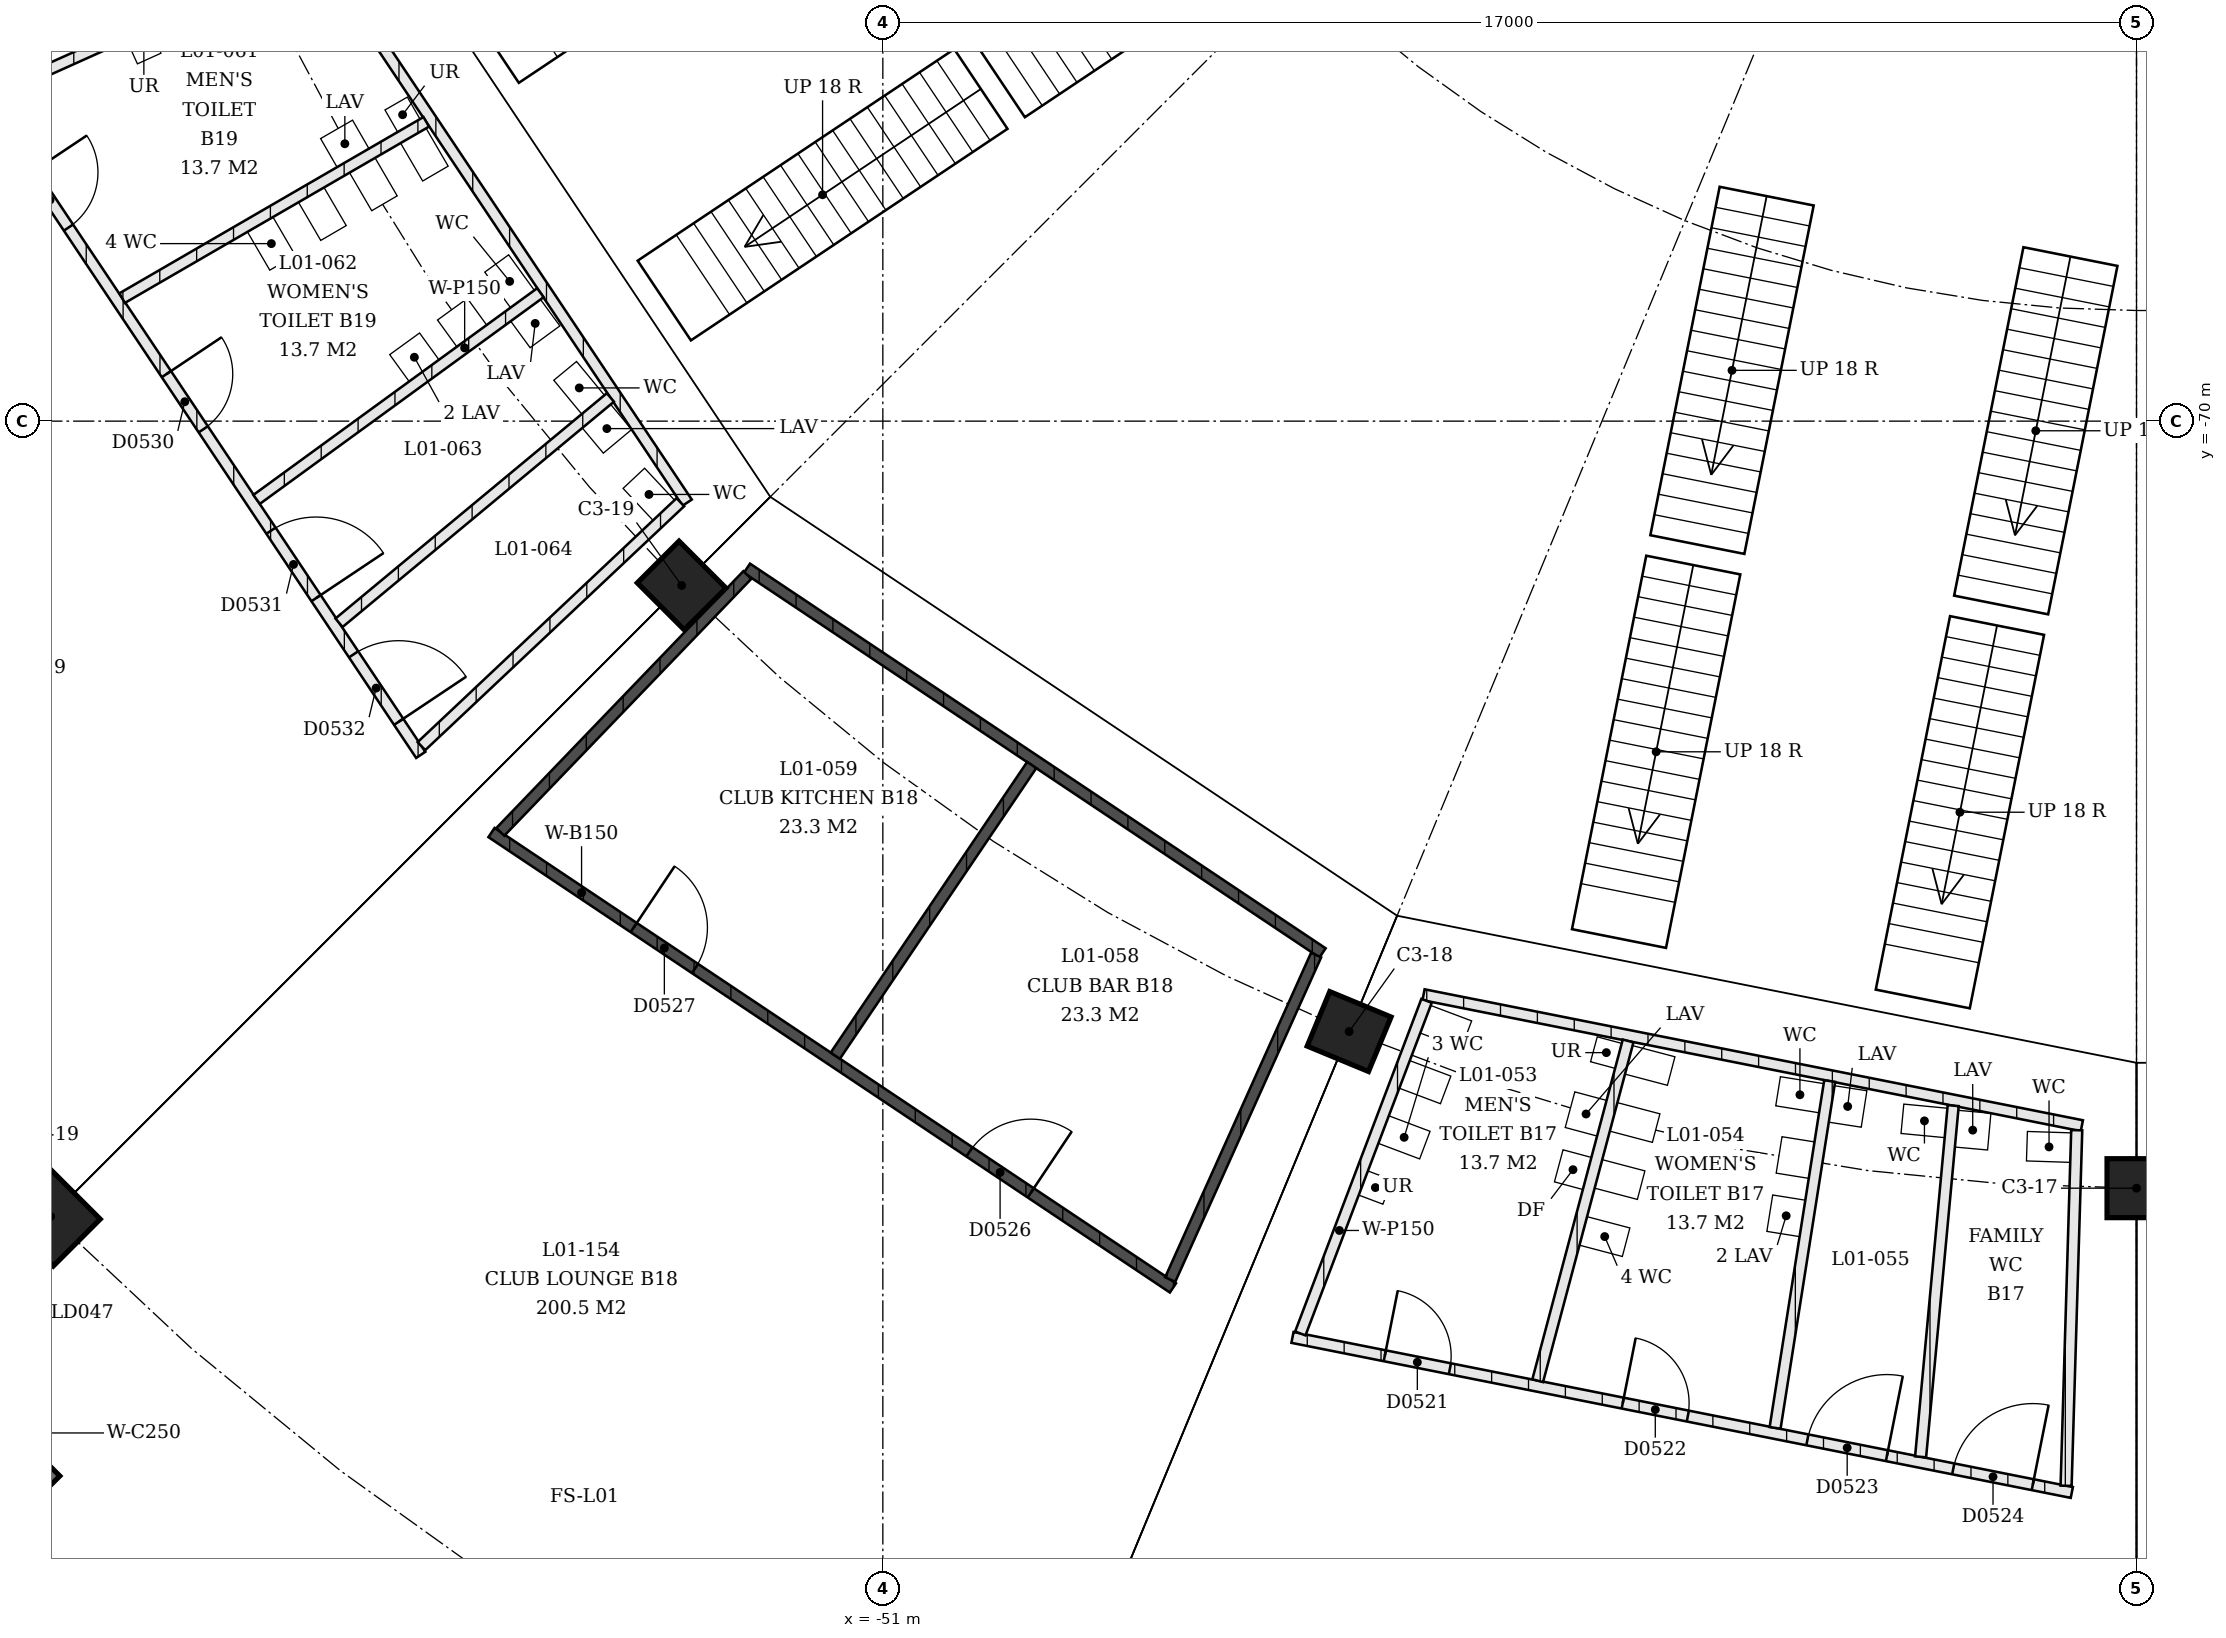
"""IFC4 building model, lengths in metres.
Left out: names, types, materials, properties, quantities, classifications, styles, units other than length and angle.
Written with IfcOpenShell. Run it as: python <this file> out.ifc"""

import sys

from ifc_helpers import new_model, si_unit, direction, frame, frame_2d, origin, origin_2d, place, context, subcontext, project, spatial, rectangle, extrude, element, fill, save


model = new_model("IFC4")
c1 = context("Model", 3, precision=1e-05, world=origin(), true_north=direction((0.0, 1.0)))
c2 = subcontext(c1, "Body", "Model", "MODEL_VIEW")
j1 = project(units=[si_unit("LENGTHUNIT", "METRE"), si_unit("PLANEANGLEUNIT", "RADIAN")], contexts=[c1])
p1 = place(None, origin())
s1 = spatial("IfcSite", under=j1, at=p1, CompositionType="ELEMENT")
p2 = place(p1, origin())
s2 = spatial("IfcBuilding", under=s1, at=p2, CompositionType="ELEMENT")
p3 = place(p2, frame((0.0, 0.0, 4.5)))
s3 = spatial("IfcBuildingStorey", under=s2, at=p3, CompositionType="ELEMENT", Elevation=4.5)
p4 = place(p3, frame((-34.0, -80.4, 0.0), z_axis=(0.0, 0.0, 1.0), x_axis=(1.0, 0.0, 0.0)))
e1 = element("IfcColumn", 1, at=p4, inside=s3, PredefinedType="COLUMN", context=c2, shape_type="SweptSolid", body=[
    extrude(rectangle(XDim=0.8, YDim=0.8, at=origin_2d()), origin(), (0.0, 0.0, 1.0), 4.5),
])
for number, where, z_axis, x_axis in (
    (2, (-44.677, -78.276, 0.0), (0.0, 0.0, 1.0), (0.924, -0.383, 0.0)),
    (3, (-53.728, -72.228, 0.0), (0.0, 0.0, 1.0), (0.707, -0.707, 0.0)),
):
    element("IfcColumn", number, at=place(p3, frame(where, z_axis=z_axis, x_axis=x_axis)), inside=s3, PredefinedType="COLUMN", context=c2, shape_type="SweptSolid", body=[
        extrude(rectangle(XDim=0.9, YDim=0.8, at=origin_2d()), origin(), (0.0, 0.0, 1.0), 4.5),
    ])
p5 = place(p3, frame((-62.284, -80.784, 0.0), z_axis=(0.0, 0.0, 1.0), x_axis=(0.707106781187, -0.707106781187, 0.0)))
e4 = element("IfcColumn", 4, at=p5, inside=s3, PredefinedType="COLUMN", context=c2, shape_type="SweptSolid", body=[
    extrude(rectangle(XDim=1.0, YDim=0.9, at=origin_2d()), origin(), (0.0, 0.0, 1.0), 4.5),
])
p6 = place(p3, frame((-65.891, -80.749, 0.0), z_axis=(0.0, 0.0, 1.0), x_axis=(0.707106781187, -0.707106781187, 0.0)))
e5 = element("IfcWall", 5, at=p6, inside=s3, PredefinedType="SHEAR", context=c2, shape_type="SweptSolid", body=[
    extrude(rectangle(XDim=5.15, YDim=0.25, at=frame_2d((2.575, 0.0))), origin(), (0.0, 0.0, 1.0), 4.09),
])
p7 = place(p6, frame((0.8, 0.0, 0.0)))
e6 = element("IfcOpeningElement", 6, at=p7, cuts=e5, PredefinedType="OPENING", context=c2, shape_type="SweptSolid", body=[
    extrude(rectangle(XDim=1.1, YDim=2.1, at=frame_2d((0.55, 1.05))), frame((0.0, 0.125, 0.0), z_axis=(0.0, -1.0, 0.0), x_axis=(1.0, 0.0, 0.0)), (0.0, 0.0, 1.0), 0.25),
])
p8 = place(p6, frame((3.25, 0.0, 0.0)))
e7 = element("IfcOpeningElement", 7, at=p8, cuts=e5, PredefinedType="OPENING", context=c2, shape_type="SweptSolid", body=[
    extrude(rectangle(XDim=1.1, YDim=2.1, at=frame_2d((0.55, 1.05))), frame((0.0, 0.125, 0.0), z_axis=(0.0, -1.0, 0.0), x_axis=(1.0, 0.0, 0.0)), (0.0, 0.0, 1.0), 0.25),
])
p9 = place(p3, frame((-43.668, -77.777, 0.0), z_axis=(0.0, 0.0, 1.0), x_axis=(0.980786464492, -0.195084369103, 0.0)))
e8 = element("IfcWall", 8, at=p9, inside=s3, PredefinedType="PARTITIONING", context=c2, shape_type="SweptSolid", body=[
    extrude(rectangle(XDim=9.102, YDim=0.15, at=frame_2d((4.551, 0.0))), origin(), (0.0, 0.0, 1.0), 3.0),
])
p10 = place(p3, frame((-45.445, -82.423, 0.0), z_axis=(0.0, 0.0, 1.0), x_axis=(0.98078580384, -0.195087690502, 0.0)))
e9 = element("IfcWall", 9, at=p10, inside=s3, PredefinedType="PARTITIONING", context=c2, shape_type="SweptSolid", body=[
    extrude(rectangle(XDim=10.775, YDim=0.15, at=frame_2d((5.387, 0.0))), origin(), (0.0, 0.0, 1.0), 3.0),
])
p11 = place(p10, frame((1.276, 0.0, 0.0)))
e10 = element("IfcOpeningElement", 10, at=p11, cuts=e9, PredefinedType="OPENING", context=c2, shape_type="SweptSolid", body=[
    extrude(rectangle(XDim=0.9, YDim=2.1, at=frame_2d((0.45, 1.05))), frame((0.0, 0.075, 0.0), z_axis=(0.0, -1.0, 0.0), x_axis=(1.0, 0.0, 0.0)), (0.0, 0.0, 1.0), 0.15),
])
p12 = place(p10, frame((4.566, 0.0, 0.0)))
e11 = element("IfcOpeningElement", 11, at=p12, cuts=e9, PredefinedType="OPENING", context=c2, shape_type="SweptSolid", body=[
    extrude(rectangle(XDim=0.9, YDim=2.1, at=frame_2d((0.45, 1.05))), frame((0.0, 0.075, 0.0), z_axis=(0.0, -1.0, 0.0), x_axis=(1.0, 0.0, 0.0)), (0.0, 0.0, 1.0), 0.15),
])
p13 = place(p10, frame((7.119, 0.0, 0.0)))
e12 = element("IfcOpeningElement", 12, at=p13, cuts=e9, PredefinedType="OPENING", context=c2, shape_type="SweptSolid", body=[
    extrude(rectangle(XDim=1.1, YDim=2.1, at=frame_2d((0.55, 1.05))), frame((0.0, 0.075, 0.0), z_axis=(0.0, -1.0, 0.0), x_axis=(1.0, 0.0, 0.0)), (0.0, 0.0, 1.0), 0.15),
])
p14 = place(p10, frame((9.135, 0.0, 0.0)))
e13 = element("IfcOpeningElement", 13, at=p14, cuts=e9, PredefinedType="OPENING", context=c2, shape_type="SweptSolid", body=[
    extrude(rectangle(XDim=1.1, YDim=2.1, at=frame_2d((0.55, 1.05))), frame((0.0, 0.075, 0.0), z_axis=(0.0, -1.0, 0.0), x_axis=(1.0, 0.0, 0.0)), (0.0, 0.0, 1.0), 0.15),
])
p15 = place(p3, frame((-43.627, -77.86, 0.0), z_axis=(0.0, 0.0, 1.0), x_axis=(-0.354909029819, -0.934900839957, 0.0)))
e14 = element("IfcWall", 14, at=p15, inside=s3, PredefinedType="PARTITIONING", context=c2, shape_type="SweptSolid", body=[
    extrude(rectangle(XDim=4.823, YDim=0.15, at=frame_2d((2.412, 0.0))), origin(), (0.0, 0.0, 1.0), 3.0),
])
p16 = place(p3, frame((-40.894, -78.404, 0.0), z_axis=(0.0, 0.0, 1.0), x_axis=(-0.257187590259, -0.966361497276, 0.0)))
e15 = element("IfcWall", 15, at=p16, inside=s3, PredefinedType="PARTITIONING", context=c2, shape_type="SweptSolid", body=[
    extrude(rectangle(XDim=4.766, YDim=0.15, at=frame_2d((2.383, 0.0))), origin(), (0.0, 0.0, 1.0), 3.0),
])
p17 = place(p3, frame((-38.161, -78.947, 0.0), z_axis=(0.0, 0.0, 1.0), x_axis=(-0.155385827215, -0.987853857967, 0.0)))
e16 = element("IfcWall", 16, at=p17, inside=s3, PredefinedType="PARTITIONING", context=c2, shape_type="SweptSolid", body=[
    extrude(rectangle(XDim=4.761, YDim=0.15, at=frame_2d((2.38, 0.0))), origin(), (0.0, 0.0, 1.0), 3.0),
])
p18 = place(p3, frame((-36.486, -79.281, 0.0), z_axis=(0.0, 0.0, 1.0), x_axis=(-0.092395037313, -0.995722429736, 0.0)))
e17 = element("IfcWall", 17, at=p18, inside=s3, PredefinedType="PARTITIONING", context=c2, shape_type="SweptSolid", body=[
    extrude(rectangle(XDim=4.783, YDim=0.15, at=frame_2d((2.391, 0.0))), origin(), (0.0, 0.0, 1.0), 3.0),
])
p19 = place(p3, frame((-34.811, -79.614, 0.0), z_axis=(0.0, 0.0, 1.0), x_axis=(-0.02991368842, -0.999552485488, 0.0)))
e18 = element("IfcWall", 18, at=p19, inside=s3, PredefinedType="PARTITIONING", context=c2, shape_type="SweptSolid", body=[
    extrude(rectangle(XDim=4.823, YDim=0.15, at=frame_2d((2.412, 0.0))), origin(), (0.0, 0.0, 1.0), 3.0),
])
p20 = place(p3, frame((-45.037, -77.21, 0.0), z_axis=(0.0, 0.0, 1.0), x_axis=(-0.83146970134, 0.555570099766, 0.0)))
e19 = element("IfcWall", 19, at=p20, inside=s3, PredefinedType="SOLIDWALL", context=c2, shape_type="SweptSolid", body=[
    extrude(rectangle(XDim=9.388, YDim=0.15, at=frame_2d((4.694, 0.0))), origin(), (0.0, 0.0, 1.0), 3.0),
])
p21 = place(p3, frame((-47.066, -81.752, 0.0), z_axis=(0.0, 0.0, 1.0), x_axis=(-0.83146852918, 0.555571854024, 0.0)))
e20 = element("IfcWall", 20, at=p21, inside=s3, PredefinedType="SOLIDWALL", context=c2, shape_type="SweptSolid", body=[
    extrude(rectangle(XDim=11.114, YDim=0.15, at=frame_2d((5.557, 0.0))), origin(), (0.0, 0.0, 1.0), 3.0),
])
p22 = place(p21, frame((2.319, 0.0, 0.0)))
e21 = element("IfcOpeningElement", 21, at=p22, cuts=e20, PredefinedType="OPENING", context=c2, shape_type="SweptSolid", body=[
    extrude(rectangle(XDim=1.0, YDim=2.1, at=frame_2d((0.5, 1.05))), frame((0.0, 0.075, 0.0), z_axis=(0.0, -1.0, 0.0), x_axis=(1.0, 0.0, 0.0)), (0.0, 0.0, 1.0), 0.15),
])
p23 = place(p21, frame((7.794, 0.0, 0.0)))
e22 = element("IfcOpeningElement", 22, at=p23, cuts=e20, PredefinedType="OPENING", context=c2, shape_type="SweptSolid", body=[
    extrude(rectangle(XDim=1.0, YDim=2.1, at=frame_2d((0.5, 1.05))), frame((0.0, 0.075, 0.0), z_axis=(0.0, -1.0, 0.0), x_axis=(1.0, 0.0, 0.0)), (0.0, 0.0, 1.0), 0.15),
])
p24 = place(p3, frame((-45.125, -77.24, 0.0), z_axis=(0.0, 0.0, 1.0), x_axis=(-0.410107887306, -0.912037017215, 0.0)))
e23 = element("IfcWall", 23, at=p24, inside=s3, PredefinedType="SOLIDWALL", context=c2, shape_type="SweptSolid", body=[
    extrude(rectangle(XDim=4.823, YDim=0.15, at=frame_2d((2.412, 0.0))), origin(), (0.0, 0.0, 1.0), 3.0),
])
p25 = place(p3, frame((-48.981, -74.663, 0.0), z_axis=(0.0, 0.0, 1.0), x_axis=(-0.559983112244, -0.828504021717, 0.0)))
e24 = element("IfcWall", 24, at=p25, inside=s3, PredefinedType="SOLIDWALL", context=c2, shape_type="SweptSolid", body=[
    extrude(rectangle(XDim=4.757, YDim=0.15, at=frame_2d((2.378, 0.0))), origin(), (0.0, 0.0, 1.0), 3.0),
])
p26 = place(p3, frame((-52.837, -72.086, 0.0), z_axis=(0.0, 0.0, 1.0), x_axis=(-0.693179391143, -0.720765101607, 0.0)))
e25 = element("IfcWall", 25, at=p26, inside=s3, PredefinedType="SOLIDWALL", context=c2, shape_type="SweptSolid", body=[
    extrude(rectangle(XDim=4.832, YDim=0.15, at=frame_2d((2.416, 0.0))), origin(), (0.0, 0.0, 1.0), 3.0),
])
p27 = place(p3, frame((-58.71, -63.537, 0.0), z_axis=(0.0, 0.0, 1.0), x_axis=(0.555566497886, -0.831472108027, 0.0)))
e26 = element("IfcWall", 26, at=p27, inside=s3, PredefinedType="PARTITIONING", context=c2, shape_type="SweptSolid", body=[
    extrude(rectangle(XDim=9.102, YDim=0.15, at=frame_2d((4.551, 0.0))), origin(), (0.0, 0.0, 1.0), 3.0),
])
p28 = place(p3, frame((-63.252, -65.566, 0.0), z_axis=(0.0, 0.0, 1.0), x_axis=(0.555562662276, -0.831474670862, 0.0)))
e27 = element("IfcWall", 27, at=p28, inside=s3, PredefinedType="PARTITIONING", context=c2, shape_type="SweptSolid", body=[
    extrude(rectangle(XDim=10.775, YDim=0.15, at=frame_2d((5.387, 0.0))), origin(), (0.0, 0.0, 1.0), 3.0),
])
p29 = place(p28, frame((1.276, 0.0, 0.0)))
e28 = element("IfcOpeningElement", 28, at=p29, cuts=e27, PredefinedType="OPENING", context=c2, shape_type="SweptSolid", body=[
    extrude(rectangle(XDim=0.9, YDim=2.1, at=frame_2d((0.45, 1.05))), frame((0.0, 0.075, 0.0), z_axis=(0.0, -1.0, 0.0), x_axis=(1.0, 0.0, 0.0)), (0.0, 0.0, 1.0), 0.15),
])
p30 = place(p28, frame((4.566, 0.0, 0.0)))
e29 = element("IfcOpeningElement", 29, at=p30, cuts=e27, PredefinedType="OPENING", context=c2, shape_type="SweptSolid", body=[
    extrude(rectangle(XDim=0.9, YDim=2.1, at=frame_2d((0.45, 1.05))), frame((0.0, 0.075, 0.0), z_axis=(0.0, -1.0, 0.0), x_axis=(1.0, 0.0, 0.0)), (0.0, 0.0, 1.0), 0.15),
])
p31 = place(p28, frame((7.119, 0.0, 0.0)))
e30 = element("IfcOpeningElement", 30, at=p31, cuts=e27, PredefinedType="OPENING", context=c2, shape_type="SweptSolid", body=[
    extrude(rectangle(XDim=1.1, YDim=2.1, at=frame_2d((0.55, 1.05))), frame((0.0, 0.075, 0.0), z_axis=(0.0, -1.0, 0.0), x_axis=(1.0, 0.0, 0.0)), (0.0, 0.0, 1.0), 0.15),
])
p32 = place(p28, frame((9.135, 0.0, 0.0)))
e31 = element("IfcOpeningElement", 31, at=p32, cuts=e27, PredefinedType="OPENING", context=c2, shape_type="SweptSolid", body=[
    extrude(rectangle(XDim=1.1, YDim=2.1, at=frame_2d((0.55, 1.05))), frame((0.0, 0.075, 0.0), z_axis=(0.0, -1.0, 0.0), x_axis=(1.0, 0.0, 0.0)), (0.0, 0.0, 1.0), 0.15),
])
p33 = place(p3, frame((-58.74, -63.625, 0.0), z_axis=(0.0, 0.0, 1.0), x_axis=(-0.912037017215, -0.410107887306, 0.0)))
e32 = element("IfcWall", 32, at=p33, inside=s3, PredefinedType="PARTITIONING", context=c2, shape_type="SweptSolid", body=[
    extrude(rectangle(XDim=4.823, YDim=0.15, at=frame_2d((2.412, 0.0))), origin(), (0.0, 0.0, 1.0), 3.0),
])
p34 = place(p3, frame((-57.191, -65.942, 0.0), z_axis=(0.0, 0.0, 1.0), x_axis=(-0.865194750368, -0.501435981891, 0.0)))
e33 = element("IfcWall", 33, at=p34, inside=s3, PredefinedType="PARTITIONING", context=c2, shape_type="SweptSolid", body=[
    extrude(rectangle(XDim=4.767, YDim=0.15, at=frame_2d((2.383, 0.0))), origin(), (0.0, 0.0, 1.0), 3.0),
])
p35 = place(p3, frame((-55.643, -68.259, 0.0), z_axis=(0.0, 0.0, 1.0), x_axis=(-0.808436593482, -0.588583277302, 0.0)))
e34 = element("IfcWall", 34, at=p35, inside=s3, PredefinedType="PARTITIONING", context=c2, shape_type="SweptSolid", body=[
    extrude(rectangle(XDim=4.76, YDim=0.15, at=frame_2d((2.38, 0.0))), origin(), (0.0, 0.0, 1.0), 3.0),
])
p36 = place(p3, frame((-54.694, -69.679, 0.0), z_axis=(0.0, 0.0, 1.0), x_axis=(-0.769445858721, -0.638712040358, 0.0)))
e35 = element("IfcWall", 35, at=p36, inside=s3, PredefinedType="PARTITIONING", context=c2, shape_type="SweptSolid", body=[
    extrude(rectangle(XDim=4.782, YDim=0.15, at=frame_2d((2.391, 0.0))), origin(), (0.0, 0.0, 1.0), 3.0),
])
p37 = place(p3, frame((-53.746, -71.099, 0.0), z_axis=(0.0, 0.0, 1.0), x_axis=(-0.727898273696, -0.685685134118, 0.0)))
e36 = element("IfcWall", 36, at=p37, inside=s3, PredefinedType="PARTITIONING", context=c2, shape_type="SweptSolid", body=[
    extrude(rectangle(XDim=4.823, YDim=0.15, at=frame_2d((2.412, 0.0))), origin(), (0.0, 0.0, 1.0), 3.0),
])
p38 = place(p11, origin())
e37 = element("IfcDoor", 37, at=p38, inside=s3, OperationType="SINGLE_SWING_RIGHT", PredefinedType="DOOR", context=c2, shape_type="SweptSolid", body=[
    extrude(rectangle(XDim=0.9, YDim=2.1, at=frame_2d((0.45, 1.05))), frame((0.0, 0.025, 0.0), z_axis=(0.0, -1.0, 0.0), x_axis=(1.0, 0.0, 0.0)), (0.0, 0.0, 1.0), 0.05),
])
fill(e10, e37)
p39 = place(p12, origin())
e38 = element("IfcDoor", 38, at=p39, inside=s3, OperationType="SINGLE_SWING_RIGHT", PredefinedType="DOOR", context=c2, shape_type="SweptSolid", body=[
    extrude(rectangle(XDim=0.9, YDim=2.1, at=frame_2d((0.45, 1.05))), frame((0.0, 0.025, 0.0), z_axis=(0.0, -1.0, 0.0), x_axis=(1.0, 0.0, 0.0)), (0.0, 0.0, 1.0), 0.05),
])
fill(e11, e38)
p40 = place(p13, origin())
e39 = element("IfcDoor", 39, at=p40, inside=s3, OperationType="SINGLE_SWING_LEFT", PredefinedType="DOOR", context=c2, shape_type="SweptSolid", body=[
    extrude(rectangle(XDim=1.1, YDim=2.1, at=frame_2d((0.55, 1.05))), frame((0.0, 0.025, 0.0), z_axis=(0.0, -1.0, 0.0), x_axis=(1.0, 0.0, 0.0)), (0.0, 0.0, 1.0), 0.05),
])
fill(e12, e39)
p41 = place(p14, origin())
e40 = element("IfcDoor", 40, at=p41, inside=s3, OperationType="SINGLE_SWING_LEFT", PredefinedType="DOOR", context=c2, shape_type="SweptSolid", body=[
    extrude(rectangle(XDim=1.1, YDim=2.1, at=frame_2d((0.55, 1.05))), frame((0.0, 0.025, 0.0), z_axis=(0.0, -1.0, 0.0), x_axis=(1.0, 0.0, 0.0)), (0.0, 0.0, 1.0), 0.05),
])
fill(e13, e40)
p42 = place(p22, origin())
e41 = element("IfcDoor", 41, at=p42, inside=s3, OperationType="SINGLE_SWING_LEFT", PredefinedType="DOOR", context=c2, shape_type="SweptSolid", body=[
    extrude(rectangle(XDim=1.0, YDim=2.1, at=frame_2d((0.5, 1.05))), frame((0.0, 0.025, 0.0), z_axis=(0.0, -1.0, 0.0), x_axis=(1.0, 0.0, 0.0)), (0.0, 0.0, 1.0), 0.05),
])
fill(e21, e41)
p43 = place(p23, origin())
e42 = element("IfcDoor", 42, at=p43, inside=s3, OperationType="SINGLE_SWING_RIGHT", PredefinedType="DOOR", context=c2, shape_type="SweptSolid", body=[
    extrude(rectangle(XDim=1.0, YDim=2.1, at=frame_2d((0.5, 1.05))), frame((0.0, 0.025, 0.0), z_axis=(0.0, -1.0, 0.0), x_axis=(1.0, 0.0, 0.0)), (0.0, 0.0, 1.0), 0.05),
])
fill(e22, e42)
p44 = place(p29, origin())
e43 = element("IfcDoor", 43, at=p44, inside=s3, OperationType="SINGLE_SWING_RIGHT", PredefinedType="DOOR", context=c2, shape_type="SweptSolid", body=[
    extrude(rectangle(XDim=0.9, YDim=2.1, at=frame_2d((0.45, 1.05))), frame((0.0, 0.025, 0.0), z_axis=(0.0, -1.0, 0.0), x_axis=(1.0, 0.0, 0.0)), (0.0, 0.0, 1.0), 0.05),
])
fill(e28, e43)
p45 = place(p30, origin())
e44 = element("IfcDoor", 44, at=p45, inside=s3, OperationType="SINGLE_SWING_RIGHT", PredefinedType="DOOR", context=c2, shape_type="SweptSolid", body=[
    extrude(rectangle(XDim=0.9, YDim=2.1, at=frame_2d((0.45, 1.05))), frame((0.0, 0.025, 0.0), z_axis=(0.0, -1.0, 0.0), x_axis=(1.0, 0.0, 0.0)), (0.0, 0.0, 1.0), 0.05),
])
fill(e29, e44)
p46 = place(p31, origin())
e45 = element("IfcDoor", 45, at=p46, inside=s3, OperationType="SINGLE_SWING_LEFT", PredefinedType="DOOR", context=c2, shape_type="SweptSolid", body=[
    extrude(rectangle(XDim=1.1, YDim=2.1, at=frame_2d((0.55, 1.05))), frame((0.0, 0.025, 0.0), z_axis=(0.0, -1.0, 0.0), x_axis=(1.0, 0.0, 0.0)), (0.0, 0.0, 1.0), 0.05),
])
fill(e30, e45)
p47 = place(p32, origin())
e46 = element("IfcDoor", 46, at=p47, inside=s3, OperationType="SINGLE_SWING_LEFT", PredefinedType="DOOR", context=c2, shape_type="SweptSolid", body=[
    extrude(rectangle(XDim=1.1, YDim=2.1, at=frame_2d((0.55, 1.05))), frame((0.0, 0.025, 0.0), z_axis=(0.0, -1.0, 0.0), x_axis=(1.0, 0.0, 0.0)), (0.0, 0.0, 1.0), 0.05),
])
fill(e31, e46)
save(model, sys.argv[1])
